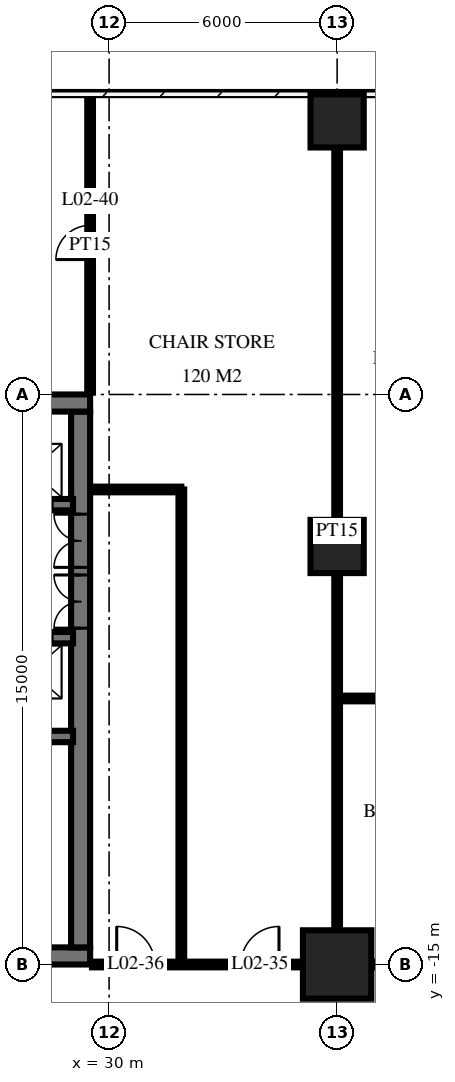
"""IFC4 building model, lengths in metres.
Left out: names, types, materials, properties, quantities, classifications, styles, units other than length and angle.
Written with IfcOpenShell. Run it as: python <this file> out.ifc"""

import sys

from ifc_helpers import new_model, si_unit, direction, frame, frame_2d, origin, origin_2d, place, context, subcontext, project, spatial, rectangle, circle, extrude, element, fill, save


model = new_model("IFC4")
c1 = context("Model", 3, precision=1e-05, world=origin(), true_north=direction((0.0, 1.0)))
c2 = subcontext(c1, "Body", "Model", "MODEL_VIEW")
j1 = project(units=[si_unit("LENGTHUNIT", "METRE"), si_unit("PLANEANGLEUNIT", "RADIAN")], contexts=[c1])
p1 = place(None, origin())
s1 = spatial("IfcSite", under=j1, at=p1, CompositionType="ELEMENT")
p2 = place(p1, origin())
s2 = spatial("IfcBuilding", under=s1, at=p2, CompositionType="ELEMENT")
p3 = place(p2, frame((0.0, 0.0, 12.5)))
s3 = spatial("IfcBuildingStorey", under=s2, at=p3, CompositionType="ELEMENT", Elevation=12.5)
p4 = place(p3, frame((36.0, -15.0, 0.0), z_axis=(0.0, 0.0, 1.0), x_axis=(1.0, 0.0, 0.0)))
e1 = element("IfcColumn", 1, at=p4, inside=s3, PredefinedType="COLUMN", context=c2, shape_type="SweptSolid", body=[
    extrude(circle(Radius=0.9, at=origin_2d()), origin(), (0.0, 0.0, 1.0), 5.5),
])
for number, where, z_axis, x_axis in (
    (2, (36.0, -4.0, 0.0), (0.0, 0.0, 1.0), (1.0, 0.0, 0.0)),
    (3, (36.0, 7.2, 0.0), (0.0, 0.0, 1.0), (1.0, 0.0, 0.0)),
):
    element("IfcColumn", number, at=place(p3, frame(where, z_axis=z_axis, x_axis=x_axis)), inside=s3, PredefinedType="COLUMN", context=c2, shape_type="SweptSolid", body=[
        extrude(circle(Radius=0.7, at=origin_2d()), origin(), (0.0, 0.0, 1.0), 5.5),
    ])
p5 = place(p3, frame((10.0, -0.225, 0.0), z_axis=(0.0, 0.0, 1.0), x_axis=(1.0, 0.0, 0.0)))
e4 = element("IfcWall", 4, at=p5, inside=s3, PredefinedType="SHEAR", context=c2, shape_type="SweptSolid", body=[
    extrude(rectangle(XDim=19.5, YDim=0.45, at=frame_2d((9.75, 0.0))), origin(), (0.0, 0.0, 1.0), 5.5),
])
p6 = place(p3, frame((10.0, -14.775, 0.0), z_axis=(0.0, 0.0, 1.0), x_axis=(1.0, 0.0, 0.0)))
e5 = element("IfcWall", 5, at=p6, inside=s3, PredefinedType="SHEAR", context=c2, shape_type="SweptSolid", body=[
    extrude(rectangle(XDim=19.5, YDim=0.45, at=frame_2d((9.75, 0.0))), origin(), (0.0, 0.0, 1.0), 5.5),
])
p7 = place(p6, frame((7.1, 0.0, 0.0)))
e6 = element("IfcOpeningElement", 6, at=p7, cuts=e5, PredefinedType="OPENING", context=c2, shape_type="SweptSolid", body=[
    extrude(rectangle(XDim=1.2, YDim=2.1, at=frame_2d((0.6, 1.05))), frame((0.0, 0.235, 0.0), z_axis=(0.0, -1.0, 0.0), x_axis=(1.0, 0.0, 0.0)), (0.0, 0.0, 1.0), 0.47),
])
p8 = place(p6, frame((4.15, 0.0, 0.0)))
e7 = element("IfcOpeningElement", 7, at=p8, cuts=e5, PredefinedType="OPENING", context=c2, shape_type="SweptSolid", body=[
    extrude(rectangle(XDim=1.1, YDim=2.1, at=frame_2d((0.55, 1.05))), frame((0.0, 0.235, 0.0), z_axis=(0.0, -1.0, 0.0), x_axis=(1.0, 0.0, 0.0)), (0.0, 0.0, 1.0), 0.47),
])
p9 = place(p6, frame((10.1, 0.0, 0.0)))
e8 = element("IfcOpeningElement", 8, at=p9, cuts=e5, PredefinedType="OPENING", context=c2, shape_type="SweptSolid", body=[
    extrude(rectangle(XDim=0.9, YDim=2.1, at=frame_2d((0.45, 1.05))), frame((0.0, 0.235, 0.0), z_axis=(0.0, -1.0, 0.0), x_axis=(1.0, 0.0, 0.0)), (0.0, 0.0, 1.0), 0.47),
])
p10 = place(p6, frame((12.45, 0.0, 0.0)))
e9 = element("IfcOpeningElement", 9, at=p10, cuts=e5, PredefinedType="OPENING", context=c2, shape_type="SweptSolid", body=[
    extrude(rectangle(XDim=1.0, YDim=2.1, at=frame_2d((0.5, 1.05))), frame((0.0, 0.235, 0.0), z_axis=(0.0, -1.0, 0.0), x_axis=(1.0, 0.0, 0.0)), (0.0, 0.0, 1.0), 0.47),
])
p11 = place(p6, frame((15.087, 0.0, 0.0)))
e10 = element("IfcOpeningElement", 10, at=p11, cuts=e5, PredefinedType="OPENING", context=c2, shape_type="SweptSolid", body=[
    extrude(rectangle(XDim=1.0, YDim=2.1, at=frame_2d((0.5, 1.05))), frame((0.0, 0.235, 0.0), z_axis=(0.0, -1.0, 0.0), x_axis=(1.0, 0.0, 0.0)), (0.0, 0.0, 1.0), 0.47),
])
p12 = place(p6, frame((17.413, 0.0, 0.0)))
e11 = element("IfcOpeningElement", 11, at=p12, cuts=e5, PredefinedType="OPENING", context=c2, shape_type="SweptSolid", body=[
    extrude(rectangle(XDim=1.0, YDim=2.1, at=frame_2d((0.5, 1.05))), frame((0.0, 0.235, 0.0), z_axis=(0.0, -1.0, 0.0), x_axis=(1.0, 0.0, 0.0)), (0.0, 0.0, 1.0), 0.47),
])
p13 = place(p3, frame((29.25, -14.55, 0.0), z_axis=(0.0, 0.0, 1.0), x_axis=(0.0, 1.0, 0.0)))
e12 = element("IfcWall", 12, at=p13, inside=s3, PredefinedType="SHEAR", context=c2, shape_type="SweptSolid", body=[
    extrude(rectangle(XDim=14.1, YDim=0.5, at=frame_2d((7.05, 0.0))), origin(), (0.0, 0.0, 1.0), 5.5),
])
p14 = place(p13, frame((8.4, 0.0, 0.0)))
e13 = element("IfcOpeningElement", 13, at=p14, cuts=e12, PredefinedType="OPENING", context=c2, shape_type="SweptSolid", body=[
    extrude(rectangle(XDim=1.4, YDim=2.4, at=frame_2d((0.7, 1.2))), frame((0.0, 0.26, 0.0), z_axis=(0.0, -1.0, 0.0), x_axis=(1.0, 0.0, 0.0)), (0.0, 0.0, 1.0), 0.52),
])
p15 = place(p13, frame((10.0, 0.0, 0.0)))
e14 = element("IfcOpeningElement", 14, at=p15, cuts=e12, PredefinedType="OPENING", context=c2, shape_type="SweptSolid", body=[
    extrude(rectangle(XDim=1.4, YDim=2.4, at=frame_2d((0.7, 1.2))), frame((0.0, 0.26, 0.0), z_axis=(0.0, -1.0, 0.0), x_axis=(1.0, 0.0, 0.0)), (0.0, 0.0, 1.0), 0.52),
])
p16 = place(p3, frame((10.35, -2.9, 0.0), z_axis=(0.0, 0.0, 1.0), x_axis=(1.0, 0.0, 0.0)))
e15 = element("IfcWall", 15, at=p16, inside=s3, PredefinedType="SHEAR", context=c2, shape_type="SweptSolid", body=[
    extrude(rectangle(XDim=18.7, YDim=0.3, at=frame_2d((9.35, 0.0))), origin(), (0.0, 0.0, 1.0), 5.5),
])
p17 = place(p16, frame((14.65, 0.0, 0.0)))
e16 = element("IfcOpeningElement", 16, at=p17, cuts=e15, PredefinedType="OPENING", context=c2, shape_type="SweptSolid", body=[
    extrude(rectangle(XDim=1.1, YDim=2.1, at=frame_2d((0.55, 1.05))), frame((0.0, 0.16, 0.0), z_axis=(0.0, -1.0, 0.0), x_axis=(1.0, 0.0, 0.0)), (0.0, 0.0, 1.0), 0.32),
])
p18 = place(p16, frame((17.05, 0.0, 0.0)))
e17 = element("IfcOpeningElement", 17, at=p18, cuts=e15, PredefinedType="OPENING", context=c2, shape_type="SweptSolid", body=[
    extrude(rectangle(XDim=1.1, YDim=2.1, at=frame_2d((0.55, 1.05))), frame((0.0, 0.16, 0.0), z_axis=(0.0, -1.0, 0.0), x_axis=(1.0, 0.0, 0.0)), (0.0, 0.0, 1.0), 0.32),
])
p19 = place(p16, frame((6.9, 0.0, 0.0)))
e18 = element("IfcOpeningElement", 18, at=p19, cuts=e15, PredefinedType="OPENING", context=c2, shape_type="SweptSolid", body=[
    extrude(rectangle(XDim=0.9, YDim=2.1, at=frame_2d((0.45, 1.05))), frame((0.0, 0.16, 0.0), z_axis=(0.0, -1.0, 0.0), x_axis=(1.0, 0.0, 0.0)), (0.0, 0.0, 1.0), 0.32),
])
p20 = place(p16, frame((0.85, 0.0, 0.0)))
e19 = element("IfcOpeningElement", 19, at=p20, cuts=e15, PredefinedType="OPENING", context=c2, shape_type="SweptSolid", body=[
    extrude(rectangle(XDim=1.0, YDim=2.1, at=frame_2d((0.5, 1.05))), frame((0.0, 0.16, 0.0), z_axis=(0.0, -1.0, 0.0), x_axis=(1.0, 0.0, 0.0)), (0.0, 0.0, 1.0), 0.32),
])
p21 = place(p16, frame((3.85, 0.0, 0.0)))
e20 = element("IfcOpeningElement", 20, at=p21, cuts=e15, PredefinedType="OPENING", context=c2, shape_type="SweptSolid", body=[
    extrude(rectangle(XDim=1.0, YDim=2.1, at=frame_2d((0.5, 1.05))), frame((0.0, 0.16, 0.0), z_axis=(0.0, -1.0, 0.0), x_axis=(1.0, 0.0, 0.0)), (0.0, 0.0, 1.0), 0.32),
])
p22 = place(p16, frame((12.1, 0.0, 0.0)))
e21 = element("IfcOpeningElement", 21, at=p22, cuts=e15, PredefinedType="OPENING", context=c2, shape_type="SweptSolid", body=[
    extrude(rectangle(XDim=1.0, YDim=2.1, at=frame_2d((0.5, 1.05))), frame((0.0, 0.16, 0.0), z_axis=(0.0, -1.0, 0.0), x_axis=(1.0, 0.0, 0.0)), (0.0, 0.0, 1.0), 0.32),
])
p23 = place(p3, frame((10.35, -6.4, 0.0), z_axis=(0.0, 0.0, 1.0), x_axis=(1.0, 0.0, 0.0)))
e22 = element("IfcWall", 22, at=p23, inside=s3, PredefinedType="SHEAR", context=c2, shape_type="SweptSolid", body=[
    extrude(rectangle(XDim=18.7, YDim=0.3, at=frame_2d((9.35, 0.0))), origin(), (0.0, 0.0, 1.0), 5.5),
])
p24 = place(p23, frame((14.65, 0.0, 0.0)))
e23 = element("IfcOpeningElement", 23, at=p24, cuts=e22, PredefinedType="OPENING", context=c2, shape_type="SweptSolid", body=[
    extrude(rectangle(XDim=1.1, YDim=2.1, at=frame_2d((0.55, 1.05))), frame((0.0, 0.16, 0.0), z_axis=(0.0, -1.0, 0.0), x_axis=(1.0, 0.0, 0.0)), (0.0, 0.0, 1.0), 0.32),
])
p25 = place(p23, frame((17.05, 0.0, 0.0)))
e24 = element("IfcOpeningElement", 24, at=p25, cuts=e22, PredefinedType="OPENING", context=c2, shape_type="SweptSolid", body=[
    extrude(rectangle(XDim=1.1, YDim=2.1, at=frame_2d((0.55, 1.05))), frame((0.0, 0.16, 0.0), z_axis=(0.0, -1.0, 0.0), x_axis=(1.0, 0.0, 0.0)), (0.0, 0.0, 1.0), 0.32),
])
p26 = place(p23, frame((6.8, 0.0, 0.0)))
e25 = element("IfcOpeningElement", 25, at=p26, cuts=e22, PredefinedType="OPENING", context=c2, shape_type="SweptSolid", body=[
    extrude(rectangle(XDim=1.1, YDim=2.1, at=frame_2d((0.55, 1.05))), frame((0.0, 0.16, 0.0), z_axis=(0.0, -1.0, 0.0), x_axis=(1.0, 0.0, 0.0)), (0.0, 0.0, 1.0), 0.32),
])
p27 = place(p23, frame((12.1, 0.0, 0.0)))
e26 = element("IfcOpeningElement", 26, at=p27, cuts=e22, PredefinedType="OPENING", context=c2, shape_type="SweptSolid", body=[
    extrude(rectangle(XDim=1.0, YDim=2.1, at=frame_2d((0.5, 1.05))), frame((0.0, 0.16, 0.0), z_axis=(0.0, -1.0, 0.0), x_axis=(1.0, 0.0, 0.0)), (0.0, 0.0, 1.0), 0.32),
])
p28 = place(p3, frame((10.35, -9.0, 0.0), z_axis=(0.0, 0.0, 1.0), x_axis=(1.0, 0.0, 0.0)))
e27 = element("IfcWall", 27, at=p28, inside=s3, PredefinedType="SHEAR", context=c2, shape_type="SweptSolid", body=[
    extrude(rectangle(XDim=18.7, YDim=0.3, at=frame_2d((9.35, 0.0))), origin(), (0.0, 0.0, 1.0), 5.5),
])
p29 = place(p28, frame((3.8, 0.0, 0.0)))
e28 = element("IfcOpeningElement", 28, at=p29, cuts=e27, PredefinedType="OPENING", context=c2, shape_type="SweptSolid", body=[
    extrude(rectangle(XDim=1.1, YDim=2.1, at=frame_2d((0.55, 1.05))), frame((0.0, 0.16, 0.0), z_axis=(0.0, -1.0, 0.0), x_axis=(1.0, 0.0, 0.0)), (0.0, 0.0, 1.0), 0.32),
])
p30 = place(p3, frame((36.0, -15.0, 0.0), z_axis=(0.0, 0.0, 1.0), x_axis=(0.0, 1.0, 0.0)))
e29 = element("IfcWall", 29, at=p30, inside=s3, PredefinedType="PARTITIONING", context=c2, shape_type="SweptSolid", body=[
    extrude(rectangle(XDim=22.82, YDim=0.15, at=frame_2d((11.41, 0.0))), origin(), (0.0, 0.0, 1.0), 5.05),
])
p31 = place(p3, frame((31.9, -15.0, 0.0), z_axis=(0.0, 0.0, 1.0), x_axis=(0.0, 1.0, 0.0)))
e30 = element("IfcWall", 30, at=p31, inside=s3, PredefinedType="PARTITIONING", context=c2, shape_type="SweptSolid", body=[
    extrude(rectangle(XDim=12.5, YDim=0.15, at=frame_2d((6.25, 0.0))), origin(), (0.0, 0.0, 1.0), 5.05),
])
p32 = place(p3, frame((29.5, 0.05, 0.0), z_axis=(0.0, 0.0, 1.0), x_axis=(0.0, 1.0, 0.0)))
e31 = element("IfcWall", 31, at=p32, inside=s3, PredefinedType="PARTITIONING", context=c2, shape_type="SweptSolid", body=[
    extrude(rectangle(XDim=7.77, YDim=0.15, at=frame_2d((3.885, 0.0))), origin(), (0.0, 0.0, 1.0), 5.05),
])
p33 = place(p32, frame((3.5, 0.0, 0.0)))
e32 = element("IfcOpeningElement", 32, at=p33, cuts=e31, PredefinedType="OPENING", context=c2, shape_type="SweptSolid", body=[
    extrude(rectangle(XDim=0.9, YDim=2.1, at=frame_2d((0.45, 1.05))), frame((0.0, 0.085, 0.0), z_axis=(0.0, -1.0, 0.0), x_axis=(1.0, 0.0, 0.0)), (0.0, 0.0, 1.0), 0.17),
])
p34 = place(p3, frame((29.55, -15.0, 0.0), z_axis=(0.0, 0.0, 1.0), x_axis=(1.0, 0.0, 0.0)))
e33 = element("IfcWall", 33, at=p34, inside=s3, PredefinedType="PARTITIONING", context=c2, shape_type="SweptSolid", body=[
    extrude(rectangle(XDim=18.27, YDim=0.15, at=frame_2d((9.135, 0.0))), origin(), (0.0, 0.0, 1.0), 5.05),
])
p35 = place(p34, frame((15.65, 0.0, 0.0)))
e34 = element("IfcOpeningElement", 34, at=p35, cuts=e33, PredefinedType="OPENING", context=c2, shape_type="SweptSolid", body=[
    extrude(rectangle(XDim=1.0, YDim=2.1, at=frame_2d((0.5, 1.05))), frame((0.0, 0.085, 0.0), z_axis=(0.0, -1.0, 0.0), x_axis=(1.0, 0.0, 0.0)), (0.0, 0.0, 1.0), 0.17),
])
p36 = place(p34, frame((13.47, 0.0, 0.0)))
e35 = element("IfcOpeningElement", 35, at=p36, cuts=e33, PredefinedType="OPENING", context=c2, shape_type="SweptSolid", body=[
    extrude(rectangle(XDim=1.0, YDim=2.1, at=frame_2d((0.5, 1.05))), frame((0.0, 0.085, 0.0), z_axis=(0.0, -1.0, 0.0), x_axis=(1.0, 0.0, 0.0)), (0.0, 0.0, 1.0), 0.17),
])
p37 = place(p34, frame((8.97, 0.0, 0.0)))
e36 = element("IfcOpeningElement", 36, at=p37, cuts=e33, PredefinedType="OPENING", context=c2, shape_type="SweptSolid", body=[
    extrude(rectangle(XDim=1.0, YDim=2.1, at=frame_2d((0.5, 1.05))), frame((0.0, 0.085, 0.0), z_axis=(0.0, -1.0, 0.0), x_axis=(1.0, 0.0, 0.0)), (0.0, 0.0, 1.0), 0.17),
])
p38 = place(p34, frame((3.92, 0.0, 0.0)))
e37 = element("IfcOpeningElement", 37, at=p38, cuts=e33, PredefinedType="OPENING", context=c2, shape_type="SweptSolid", body=[
    extrude(rectangle(XDim=1.0, YDim=2.1, at=frame_2d((0.5, 1.05))), frame((0.0, 0.085, 0.0), z_axis=(0.0, -1.0, 0.0), x_axis=(1.0, 0.0, 0.0)), (0.0, 0.0, 1.0), 0.17),
])
p39 = place(p34, frame((0.65, 0.0, 0.0)))
e38 = element("IfcOpeningElement", 38, at=p39, cuts=e33, PredefinedType="OPENING", context=c2, shape_type="SweptSolid", body=[
    extrude(rectangle(XDim=1.0, YDim=2.1, at=frame_2d((0.5, 1.05))), frame((0.0, 0.085, 0.0), z_axis=(0.0, -1.0, 0.0), x_axis=(1.0, 0.0, 0.0)), (0.0, 0.0, 1.0), 0.17),
])
p40 = place(p3, frame((36.0, -8.0, 0.0), z_axis=(0.0, 0.0, 1.0), x_axis=(1.0, 0.0, 0.0)))
e39 = element("IfcWall", 39, at=p40, inside=s3, PredefinedType="PARTITIONING", context=c2, shape_type="SweptSolid", body=[
    extrude(rectangle(XDim=6.0, YDim=0.15, at=frame_2d((3.0, 0.0))), origin(), (0.0, 0.0, 1.0), 5.05),
])
p41 = place(p40, frame((2.55, 0.0, 0.0)))
e40 = element("IfcOpeningElement", 40, at=p41, cuts=e39, PredefinedType="OPENING", context=c2, shape_type="SweptSolid", body=[
    extrude(rectangle(XDim=0.9, YDim=2.1, at=frame_2d((0.45, 1.05))), frame((0.0, 0.085, 0.0), z_axis=(0.0, -1.0, 0.0), x_axis=(1.0, 0.0, 0.0)), (0.0, 0.0, 1.0), 0.17),
])
p42 = place(p3, frame((29.55, -2.5, 0.0), z_axis=(0.0, 0.0, 1.0), x_axis=(1.0, 0.0, 0.0)))
e41 = element("IfcWall", 41, at=p42, inside=s3, PredefinedType="PARTITIONING", context=c2, shape_type="SweptSolid", body=[
    extrude(rectangle(XDim=2.35, YDim=0.15, at=frame_2d((1.175, 0.0))), origin(), (0.0, 0.0, 1.0), 5.05),
])
p43 = place(p18, origin())
e42 = element("IfcDoor", 42, at=p43, inside=s3, OperationType="DOUBLE_DOOR_SLIDING", PredefinedType="USERDEFINED", context=c2, shape_type="SweptSolid", body=[
    extrude(rectangle(XDim=1.1, YDim=2.1, at=frame_2d((0.55, 1.05))), frame((0.0, 0.025, 0.0), z_axis=(0.0, -1.0, 0.0), x_axis=(1.0, 0.0, 0.0)), (0.0, 0.0, 1.0), 0.05),
])
fill(e17, e42)
p44 = place(p25, origin())
e43 = element("IfcDoor", 43, at=p44, inside=s3, OperationType="DOUBLE_DOOR_SLIDING", PredefinedType="USERDEFINED", context=c2, shape_type="SweptSolid", body=[
    extrude(rectangle(XDim=1.1, YDim=2.1, at=frame_2d((0.55, 1.05))), frame((0.0, 0.025, 0.0), z_axis=(0.0, -1.0, 0.0), x_axis=(1.0, 0.0, 0.0)), (0.0, 0.0, 1.0), 0.05),
])
fill(e24, e43)
p45 = place(p14, origin())
e44 = element("IfcDoor", 44, at=p45, inside=s3, OperationType="DOUBLE_DOOR_SINGLE_SWING", PredefinedType="DOOR", context=c2, shape_type="SweptSolid", body=[
    extrude(rectangle(XDim=1.4, YDim=2.4, at=frame_2d((0.7, 1.2))), frame((0.0, 0.025, 0.0), z_axis=(0.0, -1.0, 0.0), x_axis=(1.0, 0.0, 0.0)), (0.0, 0.0, 1.0), 0.05),
])
fill(e13, e44)
p46 = place(p15, origin())
e45 = element("IfcDoor", 45, at=p46, inside=s3, OperationType="DOUBLE_DOOR_SINGLE_SWING", PredefinedType="DOOR", context=c2, shape_type="SweptSolid", body=[
    extrude(rectangle(XDim=1.4, YDim=2.4, at=frame_2d((0.7, 1.2))), frame((0.0, 0.025, 0.0), z_axis=(0.0, -1.0, 0.0), x_axis=(1.0, 0.0, 0.0)), (0.0, 0.0, 1.0), 0.05),
])
fill(e14, e45)
p47 = place(p38, origin())
e46 = element("IfcDoor", 46, at=p47, inside=s3, OperationType="SINGLE_SWING_LEFT", PredefinedType="DOOR", context=c2, shape_type="SweptSolid", body=[
    extrude(rectangle(XDim=1.0, YDim=2.1, at=frame_2d((0.5, 1.05))), frame((0.0, 0.025, 0.0), z_axis=(0.0, -1.0, 0.0), x_axis=(1.0, 0.0, 0.0)), (0.0, 0.0, 1.0), 0.05),
])
fill(e37, e46)
p48 = place(p39, origin())
e47 = element("IfcDoor", 47, at=p48, inside=s3, OperationType="SINGLE_SWING_RIGHT", PredefinedType="DOOR", context=c2, shape_type="SweptSolid", body=[
    extrude(rectangle(XDim=1.0, YDim=2.1, at=frame_2d((0.5, 1.05))), frame((0.0, 0.025, 0.0), z_axis=(0.0, -1.0, 0.0), x_axis=(1.0, 0.0, 0.0)), (0.0, 0.0, 1.0), 0.05),
])
fill(e38, e47)
p49 = place(p33, origin())
e48 = element("IfcDoor", 48, at=p49, inside=s3, OperationType="SINGLE_SWING_RIGHT", PredefinedType="DOOR", context=c2, shape_type="SweptSolid", body=[
    extrude(rectangle(XDim=0.9, YDim=2.1, at=frame_2d((0.45, 1.05))), frame((0.0, 0.025, 0.0), z_axis=(0.0, -1.0, 0.0), x_axis=(1.0, 0.0, 0.0)), (0.0, 0.0, 1.0), 0.05),
])
fill(e32, e48)
save(model, sys.argv[1])
